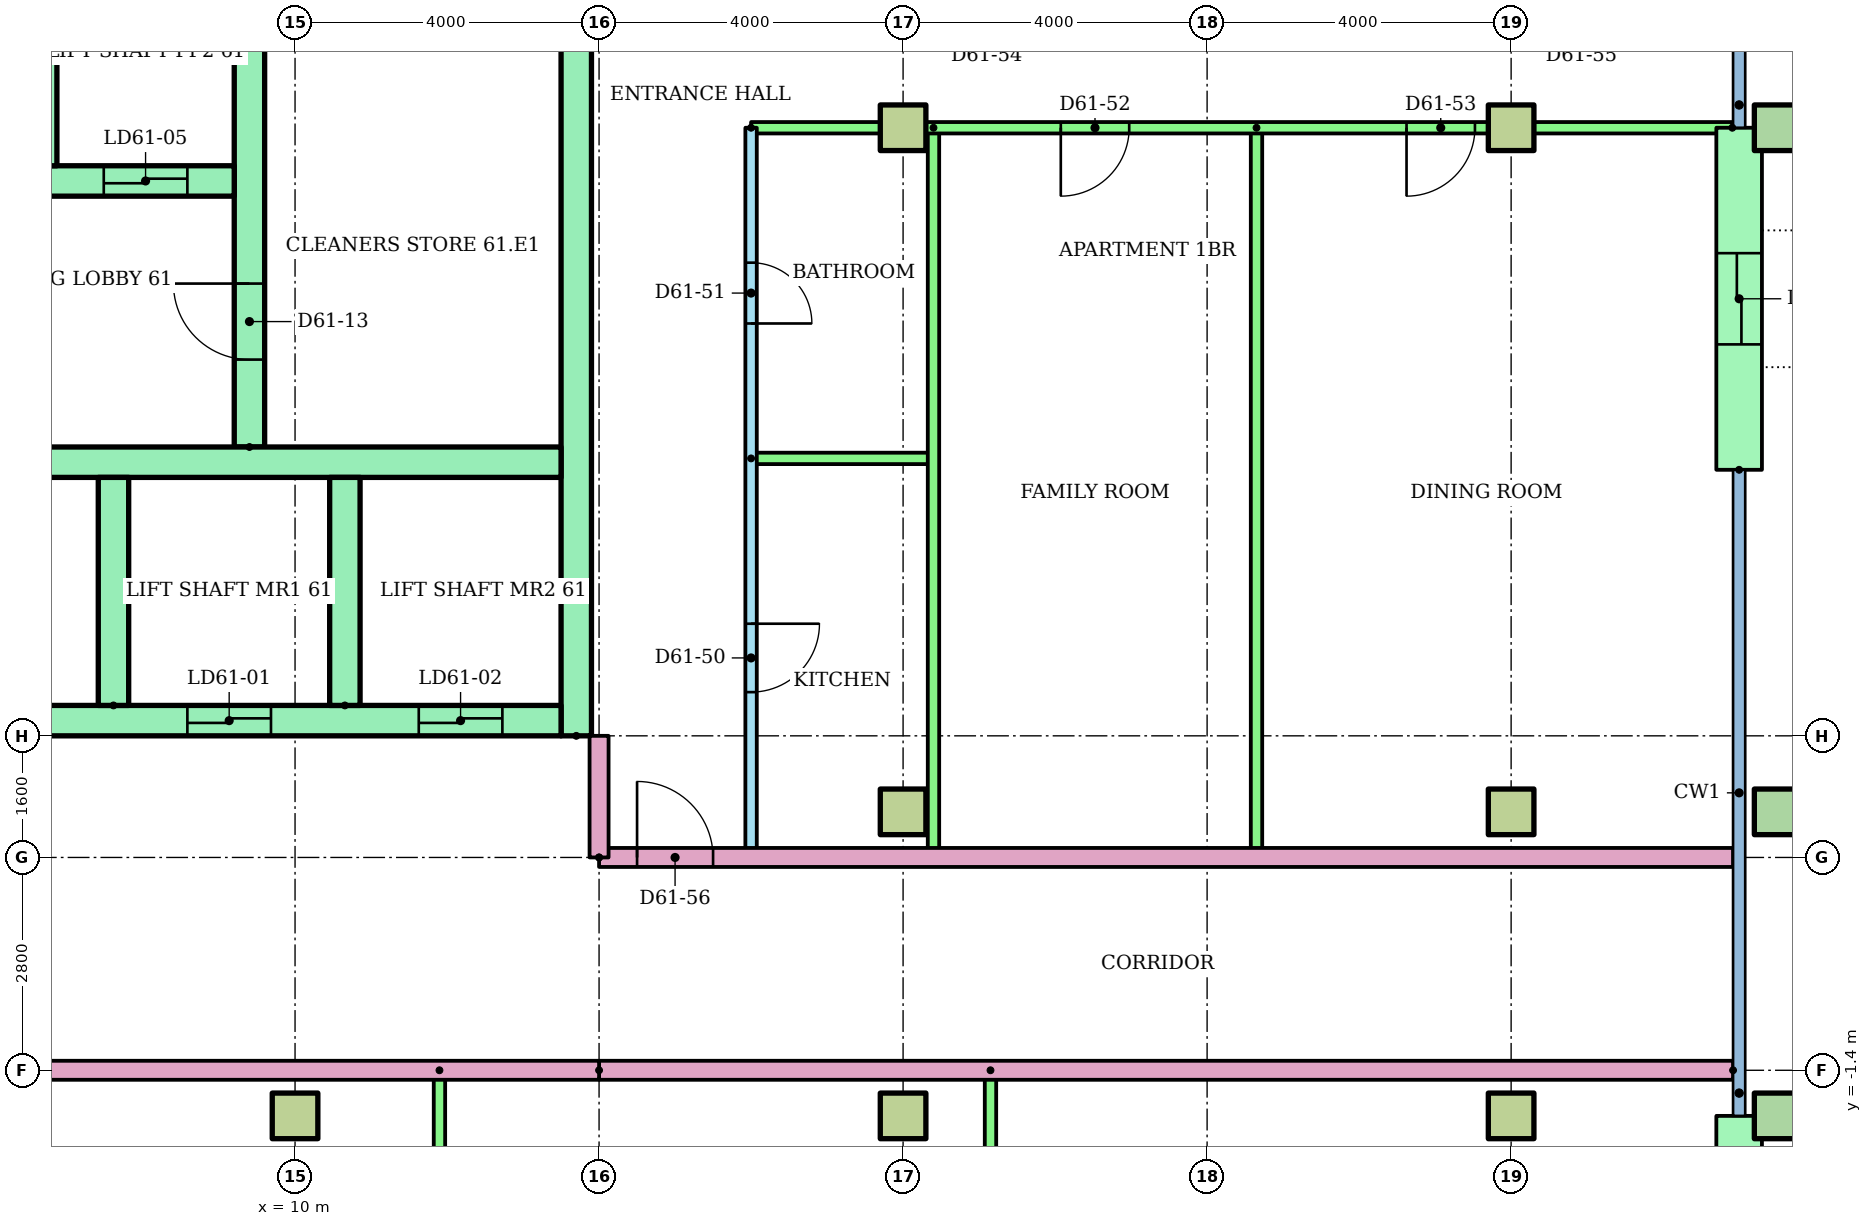
"""IFC4 building model, lengths in metres.
Left out: names, types, materials, properties, quantities, classifications, styles, units other than length and angle.
Written with IfcOpenShell. Run it as: python <this file> out.ifc"""

import sys

from ifc_helpers import new_model, si_unit, direction, frame, frame_2d, origin, origin_2d, place, context, subcontext, project, spatial, rectangle, hollow_rectangle, extrude, element, fill, save


model = new_model("IFC4")
c1 = context("Model", 3, precision=1e-05, world=origin(), true_north=direction((0.0, 1.0)))
c2 = subcontext(c1, "Body", "Model", "MODEL_VIEW")
j1 = project(units=[si_unit("LENGTHUNIT", "METRE"), si_unit("PLANEANGLEUNIT", "RADIAN")], contexts=[c1])
p1 = place(None, origin())
s1 = spatial("IfcSite", under=j1, at=p1, CompositionType="ELEMENT")
p2 = place(p1, origin())
s2 = spatial("IfcBuilding", under=s1, at=p2, CompositionType="ELEMENT")
p3 = place(p2, frame((0.0, 0.0, 233.2)))
s3 = spatial("IfcBuildingStorey", under=s2, at=p3, CompositionType="ELEMENT", Elevation=233.2)
for number, where in (
    (1, (10.0, -2.0, 0.0)),
    (2, (18.0, -2.0, 0.0)),
    (3, (26.0, -2.0, 0.0)),
):
    element("IfcColumn", number, at=place(p3, frame(where)), inside=s3, PredefinedType="COLUMN", context=c2, shape_type="SweptSolid", body=[
        extrude(rectangle(XDim=0.6, YDim=0.6, at=origin_2d()), origin(), (0.0, 0.0, 1.0), 3.2),
    ])
p4 = place(p3, frame((29.5, -2.0, 0.0)))
e4 = element("IfcColumn", 4, at=p4, inside=s3, PredefinedType="COLUMN", context=c2, shape_type="SweptSolid", body=[
    extrude(hollow_rectangle(XDim=0.6, YDim=0.6, WallThickness=0.03, at=origin_2d()), origin(), (0.0, 0.0, 1.0), 3.2),
])
for number, where in (
    (5, (18.0, 2.0, 0.0)),
    (6, (26.0, 2.0, 0.0)),
):
    element("IfcColumn", number, at=place(p3, frame(where)), inside=s3, PredefinedType="COLUMN", context=c2, shape_type="SweptSolid", body=[
        extrude(rectangle(XDim=0.6, YDim=0.6, at=origin_2d()), origin(), (0.0, 0.0, 1.0), 3.2),
    ])
p5 = place(p3, frame((29.5, 2.0, 0.0)))
e7 = element("IfcColumn", 7, at=p5, inside=s3, PredefinedType="COLUMN", context=c2, shape_type="SweptSolid", body=[
    extrude(hollow_rectangle(XDim=0.6, YDim=0.6, WallThickness=0.03, at=origin_2d()), origin(), (0.0, 0.0, 1.0), 3.2),
])
for number, where in (
    (8, (18.0, 11.0, 0.0)),
    (9, (26.0, 11.0, 0.0)),
):
    element("IfcColumn", number, at=place(p3, frame(where)), inside=s3, PredefinedType="COLUMN", context=c2, shape_type="SweptSolid", body=[
        extrude(rectangle(XDim=0.6, YDim=0.6, at=origin_2d()), origin(), (0.0, 0.0, 1.0), 3.2),
    ])
p6 = place(p3, frame((29.5, 11.0, 0.0)))
e10 = element("IfcColumn", 10, at=p6, inside=s3, PredefinedType="COLUMN", context=c2, shape_type="SweptSolid", body=[
    extrude(hollow_rectangle(XDim=0.6, YDim=0.6, WallThickness=0.03, at=origin_2d()), origin(), (0.0, 0.0, 1.0), 3.2),
])
p7 = place(p3, frame((29.0, -5.7, 0.0), z_axis=(0.0, 0.0, 1.0), x_axis=(0.0, 1.0, 0.0)))
e11 = element("IfcWall", 11, at=p7, inside=s3, PredefinedType="STANDARD", context=c2, shape_type="SweptSolid", body=[
    extrude(rectangle(XDim=3.7, YDim=0.6, at=frame_2d((1.85, 0.0))), origin(), (0.0, 0.0, 1.0), 2.92),
])
p8 = place(p7, frame((1.25, 0.0, 0.0)))
e12 = element("IfcOpeningElement", 12, at=p8, cuts=e11, PredefinedType="OPENING", context=c2, shape_type="SweptSolid", body=[
    extrude(rectangle(XDim=1.2, YDim=2.1, at=frame_2d((0.6, 1.05))), frame((0.0, 0.31, 0.0), z_axis=(0.0, -1.0, 0.0), x_axis=(1.0, 0.0, 0.0)), (0.0, 0.0, 1.0), 0.62),
])
p9 = place(p3, frame((29.0, 6.5, 0.0), z_axis=(0.0, 0.0, 1.0), x_axis=(0.0, 1.0, 0.0)))
e13 = element("IfcWall", 13, at=p9, inside=s3, PredefinedType="STANDARD", context=c2, shape_type="SweptSolid", body=[
    extrude(rectangle(XDim=4.5, YDim=0.6, at=frame_2d((2.25, 0.0))), origin(), (0.0, 0.0, 1.0), 2.92),
])
p10 = place(p9, frame((1.65, 0.0, 0.0)))
e14 = element("IfcOpeningElement", 14, at=p10, cuts=e13, PredefinedType="OPENING", context=c2, shape_type="SweptSolid", body=[
    extrude(rectangle(XDim=1.2, YDim=2.1, at=frame_2d((0.6, 1.05))), frame((0.0, 0.31, 0.0), z_axis=(0.0, -1.0, 0.0), x_axis=(1.0, 0.0, 0.0)), (0.0, 0.0, 1.0), 0.62),
])
p11 = place(p3, frame((13.7, 3.0, 0.0), z_axis=(0.0, 0.0, 1.0), x_axis=(0.0, 1.0, 0.0)))
e15 = element("IfcWall", 15, at=p11, inside=s3, PredefinedType="SHEAR", context=c2, shape_type="SweptSolid", body=[
    extrude(rectangle(XDim=17.0, YDim=0.4, at=frame_2d((8.5, 0.0))), origin(), (0.0, 0.0, 1.0), 2.92),
])
p12 = place(p3, frame((9.4, 6.8, 0.0), z_axis=(0.0, 0.0, 1.0), x_axis=(0.0, 1.0, 0.0)))
e16 = element("IfcWall", 16, at=p12, inside=s3, PredefinedType="SHEAR", context=c2, shape_type="SweptSolid", body=[
    extrude(rectangle(XDim=12.7, YDim=0.4, at=frame_2d((6.35, 0.0))), origin(), (0.0, 0.0, 1.0), 2.92),
])
p13 = place(p12, frame((1.15, 0.0, 0.0)))
e17 = element("IfcOpeningElement", 17, at=p13, cuts=e16, PredefinedType="OPENING", context=c2, shape_type="SweptSolid", body=[
    extrude(rectangle(XDim=1.0, YDim=2.1, at=frame_2d((0.5, 1.05))), frame((0.0, 0.21, 0.0), z_axis=(0.0, -1.0, 0.0), x_axis=(1.0, 0.0, 0.0)), (0.0, 0.0, 1.0), 0.42),
])
p14 = place(p12, frame((7.925, 0.0, 0.0)))
e18 = element("IfcOpeningElement", 18, at=p14, cuts=e16, PredefinedType="OPENING", context=c2, shape_type="SweptSolid", body=[
    extrude(rectangle(XDim=1.0, YDim=2.1, at=frame_2d((0.5, 1.05))), frame((0.0, 0.21, 0.0), z_axis=(0.0, -1.0, 0.0), x_axis=(1.0, 0.0, 0.0)), (0.0, 0.0, 1.0), 0.42),
])
p15 = place(p3, frame((-13.5, 3.2, 0.0)))
e19 = element("IfcWall", 19, at=p15, inside=s3, PredefinedType="SHEAR", context=c2, shape_type="SweptSolid", body=[
    extrude(rectangle(XDim=27.0, YDim=0.4, at=frame_2d((13.5, 0.0))), origin(), (0.0, 0.0, 1.0), 2.92),
])
p16 = place(p15, frame((22.083, 0.0, 0.0)))
e20 = element("IfcOpeningElement", 20, at=p16, cuts=e19, PredefinedType="OPENING", context=c2, shape_type="SweptSolid", body=[
    extrude(rectangle(XDim=1.1, YDim=2.1, at=frame_2d((0.55, 1.05))), frame((0.0, 0.21, 0.0), z_axis=(0.0, -1.0, 0.0), x_axis=(1.0, 0.0, 0.0)), (0.0, 0.0, 1.0), 0.42),
])
p17 = place(p15, frame((25.128, 0.0, 0.0)))
e21 = element("IfcOpeningElement", 21, at=p17, cuts=e19, PredefinedType="OPENING", context=c2, shape_type="SweptSolid", body=[
    extrude(rectangle(XDim=1.1, YDim=2.1, at=frame_2d((0.55, 1.05))), frame((0.0, 0.21, 0.0), z_axis=(0.0, -1.0, 0.0), x_axis=(1.0, 0.0, 0.0)), (0.0, 0.0, 1.0), 0.42),
])
p18 = place(p15, frame((12.6, 0.0, 0.0)))
e22 = element("IfcOpeningElement", 22, at=p18, cuts=e19, PredefinedType="OPENING", context=c2, shape_type="SweptSolid", body=[
    extrude(rectangle(XDim=1.8, YDim=2.1, at=frame_2d((0.9, 1.05))), frame((0.0, 0.21, 0.0), z_axis=(0.0, -1.0, 0.0), x_axis=(1.0, 0.0, 0.0)), (0.0, 0.0, 1.0), 0.42),
])
p19 = place(p3, frame((1.522, 6.6, 0.0)))
e23 = element("IfcWall", 23, at=p19, inside=s3, PredefinedType="SHEAR", context=c2, shape_type="SweptSolid", body=[
    extrude(rectangle(XDim=11.978, YDim=0.4, at=frame_2d((5.989, 0.0))), origin(), (0.0, 0.0, 1.0), 2.92),
])
p20 = place(p19, frame((2.544, 0.0, 0.0)))
e24 = element("IfcOpeningElement", 24, at=p20, cuts=e23, PredefinedType="OPENING", context=c2, shape_type="SweptSolid", body=[
    extrude(rectangle(XDim=1.0, YDim=2.1, at=frame_2d((0.5, 1.05))), frame((0.0, 0.21, 0.0), z_axis=(0.0, -1.0, 0.0), x_axis=(1.0, 0.0, 0.0)), (0.0, 0.0, 1.0), 0.42),
])
for number, where, z_axis, x_axis in (
    (25, (7.611, 3.4, 0.0), (0.0, 0.0, 1.0), (0.0, 1.0, 0.0)),
    (26, (10.656, 3.4, 0.0), (0.0, 0.0, 1.0), (0.0, 1.0, 0.0)),
):
    element("IfcWall", number, at=place(p3, frame(where, z_axis=z_axis, x_axis=x_axis)), inside=s3, PredefinedType="SHEAR", context=c2, shape_type="SweptSolid", body=[
        extrude(rectangle(XDim=3.0, YDim=0.4, at=frame_2d((1.5, 0.0))), origin(), (0.0, 0.0, 1.0), 2.92),
    ])
p21 = place(p3, frame((1.2, 10.3, 0.0)))
e27 = element("IfcWall", 27, at=p21, inside=s3, PredefinedType="SHEAR", context=c2, shape_type="SweptSolid", body=[
    extrude(rectangle(XDim=8.0, YDim=0.4, at=frame_2d((4.0, 0.0))), origin(), (0.0, 0.0, 1.0), 2.92),
])
p22 = place(p21, frame((3.55, 0.0, 0.0)))
e28 = element("IfcOpeningElement", 28, at=p22, cuts=e27, PredefinedType="OPENING", context=c2, shape_type="SweptSolid", body=[
    extrude(rectangle(XDim=1.1, YDim=2.1, at=frame_2d((0.55, 1.05))), frame((0.0, 0.21, 0.0), z_axis=(0.0, -1.0, 0.0), x_axis=(1.0, 0.0, 0.0)), (0.0, 0.0, 1.0), 0.42),
])
p23 = place(p21, frame((6.283, 0.0, 0.0)))
e29 = element("IfcOpeningElement", 29, at=p23, cuts=e27, PredefinedType="OPENING", context=c2, shape_type="SweptSolid", body=[
    extrude(rectangle(XDim=1.1, YDim=2.1, at=frame_2d((0.55, 1.05))), frame((0.0, 0.21, 0.0), z_axis=(0.0, -1.0, 0.0), x_axis=(1.0, 0.0, 0.0)), (0.0, 0.0, 1.0), 0.42),
])
p24 = place(p21, frame((0.867, 0.0, 0.0)))
e30 = element("IfcOpeningElement", 30, at=p24, cuts=e27, PredefinedType="OPENING", context=c2, shape_type="SweptSolid", body=[
    extrude(rectangle(XDim=1.0, YDim=2.1, at=frame_2d((0.5, 1.05))), frame((0.0, 0.21, 0.0), z_axis=(0.0, -1.0, 0.0), x_axis=(1.0, 0.0, 0.0)), (0.0, 0.0, 1.0), 0.42),
])
p25 = place(p3, frame((6.667, 10.5, 0.0), z_axis=(0.0, 0.0, 1.0), x_axis=(0.0, 1.0, 0.0)))
e31 = element("IfcWall", 31, at=p25, inside=s3, PredefinedType="SHEAR", context=c2, shape_type="SweptSolid", body=[
    extrude(rectangle(XDim=3.0, YDim=0.4, at=frame_2d((1.5, 0.0))), origin(), (0.0, 0.0, 1.0), 2.92),
])
for number, where, z_axis, x_axis in (
    (32, (11.9, -1.4, 0.0), (0.0, 0.0, 1.0), (0.0, -1.0, 0.0)),
    (33, (19.15, -1.4, 0.0), (0.0, 0.0, 1.0), (0.0, -1.0, 0.0)),
):
    element("IfcWall", number, at=place(p3, frame(where, z_axis=z_axis, x_axis=x_axis)), inside=s3, PredefinedType="PARTITIONING", context=c2, shape_type="SweptSolid", body=[
        extrude(rectangle(XDim=7.2, YDim=0.15, at=frame_2d((3.6, 0.0))), origin(), (0.0, 0.0, 1.0), 2.4),
    ])
p26 = place(p3, frame((28.92, -1.4, 0.0), z_axis=(0.0, 0.0, 1.0), x_axis=(-1.0, 0.0, 0.0)))
e34 = element("IfcWall", 34, at=p26, inside=s3, PredefinedType="PARTITIONING", context=c2, shape_type="SweptSolid", body=[
    extrude(rectangle(XDim=14.92, YDim=0.25, at=frame_2d((7.46, 0.0))), origin(), (0.0, 0.0, 1.0), 2.4),
])
p27 = place(p3, frame((16.0, 11.0, 0.0), z_axis=(0.0, 0.0, 1.0), x_axis=(0.0, -1.0, 0.0)))
e35 = element("IfcWall", 35, at=p27, inside=s3, PredefinedType="PARTITIONING", context=c2, shape_type="SweptSolid", body=[
    extrude(rectangle(XDim=9.6, YDim=0.15, at=frame_2d((4.8, 0.0))), origin(), (0.0, 0.0, 1.0), 2.4),
])
p28 = place(p27, frame((6.525, 0.0, 0.0)))
e36 = element("IfcOpeningElement", 36, at=p28, cuts=e35, PredefinedType="OPENING", context=c2, shape_type="SweptSolid", body=[
    extrude(rectangle(XDim=0.9, YDim=2.1, at=frame_2d((0.45, 1.05))), frame((0.0, 0.085, 0.0), z_axis=(0.0, -1.0, 0.0), x_axis=(1.0, 0.0, 0.0)), (0.0, 0.0, 1.0), 0.17),
])
p29 = place(p27, frame((1.775, 0.0, 0.0)))
e37 = element("IfcOpeningElement", 37, at=p29, cuts=e35, PredefinedType="OPENING", context=c2, shape_type="SweptSolid", body=[
    extrude(rectangle(XDim=0.8, YDim=2.1, at=frame_2d((0.4, 1.05))), frame((0.0, 0.085, 0.0), z_axis=(0.0, -1.0, 0.0), x_axis=(1.0, 0.0, 0.0)), (0.0, 0.0, 1.0), 0.17),
])
p30 = place(p3, frame((16.0, 6.65, 0.0)))
e38 = element("IfcWall", 38, at=p30, inside=s3, PredefinedType="PARTITIONING", context=c2, shape_type="SweptSolid", body=[
    extrude(rectangle(XDim=2.4, YDim=0.15, at=frame_2d((1.2, 0.0))), origin(), (0.0, 0.0, 1.0), 2.4),
])
for number, where, z_axis, x_axis in (
    (39, (18.4, 11.0, 0.0), (0.0, 0.0, 1.0), (0.0, -1.0, 0.0)),
    (40, (22.65, 11.0, 0.0), (0.0, 0.0, 1.0), (0.0, -1.0, 0.0)),
):
    element("IfcWall", number, at=place(p3, frame(where, z_axis=z_axis, x_axis=x_axis)), inside=s3, PredefinedType="PARTITIONING", context=c2, shape_type="SweptSolid", body=[
        extrude(rectangle(XDim=9.6, YDim=0.15, at=frame_2d((4.8, 0.0))), origin(), (0.0, 0.0, 1.0), 2.4),
    ])
p31 = place(p3, frame((28.91, 11.0, 0.0), z_axis=(0.0, 0.0, 1.0), x_axis=(-1.0, 0.0, 0.0)))
e41 = element("IfcWall", 41, at=p31, inside=s3, PredefinedType="PARTITIONING", context=c2, shape_type="SweptSolid", body=[
    extrude(rectangle(XDim=12.91, YDim=0.15, at=frame_2d((6.455, 0.0))), origin(), (0.0, 0.0, 1.0), 2.4),
])
p32 = place(p31, frame((7.935, 0.0, 0.0)))
e42 = element("IfcOpeningElement", 42, at=p32, cuts=e41, PredefinedType="OPENING", context=c2, shape_type="SweptSolid", body=[
    extrude(rectangle(XDim=0.9, YDim=2.1, at=frame_2d((0.45, 1.05))), frame((0.0, 0.085, 0.0), z_axis=(0.0, -1.0, 0.0), x_axis=(1.0, 0.0, 0.0)), (0.0, 0.0, 1.0), 0.17),
])
p33 = place(p31, frame((3.386, 0.0, 0.0)))
e43 = element("IfcOpeningElement", 43, at=p33, cuts=e41, PredefinedType="OPENING", context=c2, shape_type="SweptSolid", body=[
    extrude(rectangle(XDim=0.9, YDim=2.1, at=frame_2d((0.45, 1.05))), frame((0.0, 0.085, 0.0), z_axis=(0.0, -1.0, 0.0), x_axis=(1.0, 0.0, 0.0)), (0.0, 0.0, 1.0), 0.17),
])
p34 = place(p3, frame((14.0, 1.4, 0.0)))
e44 = element("IfcWall", 44, at=p34, inside=s3, PredefinedType="PARTITIONING", context=c2, shape_type="SweptSolid", body=[
    extrude(rectangle(XDim=14.92, YDim=0.25, at=frame_2d((7.46, 0.0))), origin(), (0.0, 0.0, 1.0), 2.4),
])
p35 = place(p34, frame((0.5, 0.0, 0.0)))
e45 = element("IfcOpeningElement", 45, at=p35, cuts=e44, PredefinedType="OPENING", context=c2, shape_type="SweptSolid", body=[
    extrude(rectangle(XDim=1.0, YDim=2.1, at=frame_2d((0.5, 1.05))), frame((0.0, 0.135, 0.0), z_axis=(0.0, -1.0, 0.0), x_axis=(1.0, 0.0, 0.0)), (0.0, 0.0, 1.0), 0.27),
])
p36 = place(p3, frame((14.0, -1.4, 0.0), z_axis=(0.0, 0.0, 1.0), x_axis=(-1.0, 0.0, 0.0)))
e46 = element("IfcWall", 46, at=p36, inside=s3, PredefinedType="PARTITIONING", context=c2, shape_type="SweptSolid", body=[
    extrude(rectangle(XDim=28.0, YDim=0.25, at=frame_2d((14.0, 0.0))), origin(), (0.0, 0.0, 1.0), 2.4),
])
p37 = place(p36, frame((12.5, 0.0, 0.0)))
e47 = element("IfcOpeningElement", 47, at=p37, cuts=e46, PredefinedType="OPENING", context=c2, shape_type="SweptSolid", body=[
    extrude(rectangle(XDim=1.0, YDim=2.1, at=frame_2d((0.5, 1.05))), frame((0.0, 0.135, 0.0), z_axis=(0.0, -1.0, 0.0), x_axis=(1.0, 0.0, 0.0)), (0.0, 0.0, 1.0), 0.27),
])
p38 = place(p36, frame((10.5, 0.0, 0.0)))
e48 = element("IfcOpeningElement", 48, at=p38, cuts=e46, PredefinedType="OPENING", context=c2, shape_type="SweptSolid", body=[
    extrude(rectangle(XDim=1.0, YDim=2.1, at=frame_2d((0.5, 1.05))), frame((0.0, 0.135, 0.0), z_axis=(0.0, -1.0, 0.0), x_axis=(1.0, 0.0, 0.0)), (0.0, 0.0, 1.0), 0.27),
])
p39 = place(p3, frame((14.0, 1.4, 0.0), z_axis=(0.0, 0.0, 1.0), x_axis=(0.0, 1.0, 0.0)))
e49 = element("IfcWall", 49, at=p39, inside=s3, PredefinedType="PARTITIONING", context=c2, shape_type="SweptSolid", body=[
    extrude(rectangle(XDim=1.6, YDim=0.25, at=frame_2d((0.8, 0.0))), origin(), (0.0, 0.0, 1.0), 2.4),
])
p40 = place(p16, origin())
e50 = element("IfcDoor", 50, at=p40, inside=s3, OperationType="SLIDING_TO_LEFT", PredefinedType="DOOR", context=c2, shape_type="SweptSolid", body=[
    extrude(rectangle(XDim=1.1, YDim=2.1, at=frame_2d((0.55, 1.05))), frame((0.0, 0.025, 0.0), z_axis=(0.0, -1.0, 0.0), x_axis=(1.0, 0.0, 0.0)), (0.0, 0.0, 1.0), 0.05),
])
fill(e20, e50)
p41 = place(p17, origin())
e51 = element("IfcDoor", 51, at=p41, inside=s3, OperationType="SLIDING_TO_LEFT", PredefinedType="DOOR", context=c2, shape_type="SweptSolid", body=[
    extrude(rectangle(XDim=1.1, YDim=2.1, at=frame_2d((0.55, 1.05))), frame((0.0, 0.025, 0.0), z_axis=(0.0, -1.0, 0.0), x_axis=(1.0, 0.0, 0.0)), (0.0, 0.0, 1.0), 0.05),
])
fill(e21, e51)
p42 = place(p23, origin())
e52 = element("IfcDoor", 52, at=p42, inside=s3, OperationType="SLIDING_TO_LEFT", PredefinedType="DOOR", context=c2, shape_type="SweptSolid", body=[
    extrude(rectangle(XDim=1.1, YDim=2.1, at=frame_2d((0.55, 1.05))), frame((0.0, 0.025, 0.0), z_axis=(0.0, -1.0, 0.0), x_axis=(1.0, 0.0, 0.0)), (0.0, 0.0, 1.0), 0.05),
])
fill(e29, e52)
p43 = place(p13, origin())
e53 = element("IfcDoor", 53, at=p43, inside=s3, OperationType="SINGLE_SWING_RIGHT", PredefinedType="DOOR", context=c2, shape_type="SweptSolid", body=[
    extrude(rectangle(XDim=1.0, YDim=2.1, at=frame_2d((0.5, 1.05))), frame((0.0, 0.025, 0.0), z_axis=(0.0, -1.0, 0.0), x_axis=(1.0, 0.0, 0.0)), (0.0, 0.0, 1.0), 0.05),
])
fill(e17, e53)
p44 = place(p28, origin())
e54 = element("IfcDoor", 54, at=p44, inside=s3, OperationType="SINGLE_SWING_LEFT", PredefinedType="DOOR", context=c2, shape_type="SweptSolid", body=[
    extrude(rectangle(XDim=0.9, YDim=2.1, at=frame_2d((0.45, 1.05))), frame((0.0, 0.025, 0.0), z_axis=(0.0, -1.0, 0.0), x_axis=(1.0, 0.0, 0.0)), (0.0, 0.0, 1.0), 0.05),
])
fill(e36, e54)
p45 = place(p29, origin())
e55 = element("IfcDoor", 55, at=p45, inside=s3, OperationType="SINGLE_SWING_RIGHT", PredefinedType="DOOR", context=c2, shape_type="SweptSolid", body=[
    extrude(rectangle(XDim=0.8, YDim=2.1, at=frame_2d((0.4, 1.05))), frame((0.0, 0.025, 0.0), z_axis=(0.0, -1.0, 0.0), x_axis=(1.0, 0.0, 0.0)), (0.0, 0.0, 1.0), 0.05),
])
fill(e37, e55)
p46 = place(p32, origin())
e56 = element("IfcDoor", 56, at=p46, inside=s3, OperationType="SINGLE_SWING_RIGHT", PredefinedType="DOOR", context=c2, shape_type="SweptSolid", body=[
    extrude(rectangle(XDim=0.9, YDim=2.1, at=frame_2d((0.45, 1.05))), frame((0.0, 0.025, 0.0), z_axis=(0.0, -1.0, 0.0), x_axis=(1.0, 0.0, 0.0)), (0.0, 0.0, 1.0), 0.05),
])
fill(e42, e56)
p47 = place(p33, origin())
e57 = element("IfcDoor", 57, at=p47, inside=s3, OperationType="SINGLE_SWING_RIGHT", PredefinedType="DOOR", context=c2, shape_type="SweptSolid", body=[
    extrude(rectangle(XDim=0.9, YDim=2.1, at=frame_2d((0.45, 1.05))), frame((0.0, 0.025, 0.0), z_axis=(0.0, -1.0, 0.0), x_axis=(1.0, 0.0, 0.0)), (0.0, 0.0, 1.0), 0.05),
])
fill(e43, e57)
p48 = place(p35, origin())
e58 = element("IfcDoor", 58, at=p48, inside=s3, OperationType="SINGLE_SWING_LEFT", PredefinedType="DOOR", context=c2, shape_type="SweptSolid", body=[
    extrude(rectangle(XDim=1.0, YDim=2.1, at=frame_2d((0.5, 1.05))), frame((0.0, 0.025, 0.0), z_axis=(0.0, -1.0, 0.0), x_axis=(1.0, 0.0, 0.0)), (0.0, 0.0, 1.0), 0.05),
])
fill(e45, e58)
p49 = place(p10, origin())
e59 = element("IfcDoor", 59, at=p49, inside=s3, OperationType="SLIDING_TO_LEFT", PredefinedType="DOOR", context=c2, shape_type="SweptSolid", body=[
    extrude(rectangle(XDim=1.2, YDim=2.1, at=frame_2d((0.6, 1.05))), frame((0.0, 0.025, 0.0), z_axis=(0.0, -1.0, 0.0), x_axis=(1.0, 0.0, 0.0)), (0.0, 0.0, 1.0), 0.05),
])
fill(e14, e59)
save(model, sys.argv[1])
